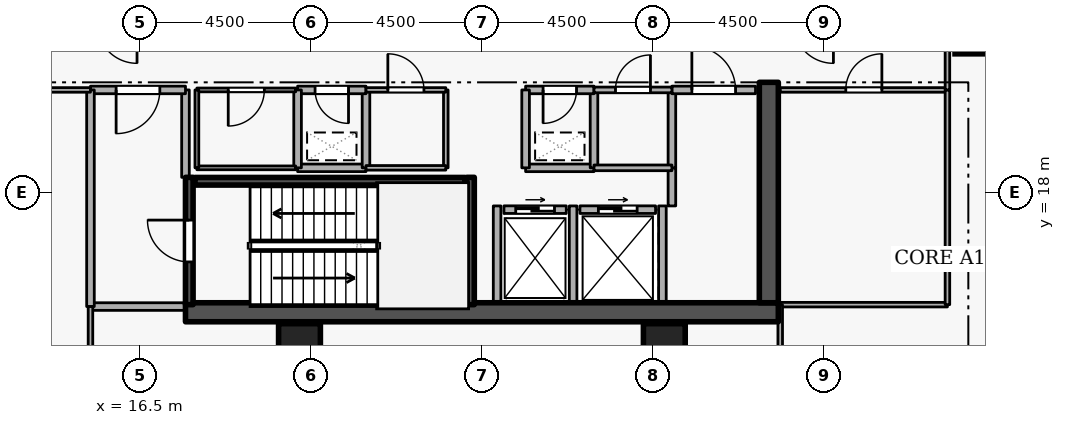
"""IFC4 building model, lengths in metres.
Left out: names, types, materials, properties, quantities, classifications, styles, units other than length and angle.
Written with IfcOpenShell. Run it as: python <this file> out.ifc"""

import sys

from ifc_helpers import new_model, si_unit, direction, frame, frame_2d, origin, origin_2d, place, context, subcontext, project, spatial, rectangle, extrude, element, fill, save


model = new_model("IFC4")
c1 = context("Model", 3, precision=1e-05, world=origin(), true_north=direction((0.0, 1.0)))
c2 = subcontext(c1, "Body", "Model", "MODEL_VIEW")
j1 = project(units=[si_unit("LENGTHUNIT", "METRE"), si_unit("PLANEANGLEUNIT", "RADIAN")], contexts=[c1])
p1 = place(None, origin())
s1 = spatial("IfcSite", under=j1, at=p1, CompositionType="ELEMENT")
p2 = place(p1, origin())
s2 = spatial("IfcBuilding", under=s1, at=p2, CompositionType="ELEMENT")
p3 = place(p2, frame((0.0, 0.0, 174.3)))
s3 = spatial("IfcBuildingStorey", under=s2, at=p3, CompositionType="ELEMENT", Elevation=174.3)
p4 = place(p3, frame((17.7, 14.85, 0.0), z_axis=(0.0, 0.0, 1.0), x_axis=(1.0, 0.0, 0.0)))
e1 = element("IfcWall", 1, at=p4, inside=s3, PredefinedType="SHEAR", context=c2, shape_type="SweptSolid", body=[
    extrude(rectangle(XDim=15.6, YDim=0.5, at=frame_2d((7.8, 0.0))), origin(), (0.0, 0.0, 1.0), 4.2),
])
p5 = place(p3, frame((33.05, 15.1, 0.0), z_axis=(0.0, 0.0, 1.0), x_axis=(0.0, 1.0, 0.0)))
e2 = element("IfcWall", 2, at=p5, inside=s3, PredefinedType="SHEAR", context=c2, shape_type="SweptSolid", body=[
    extrude(rectangle(XDim=5.8, YDim=0.5, at=frame_2d((2.9, 0.0))), origin(), (0.0, 0.0, 1.0), 4.2),
])
for number, where, z_axis, x_axis in (
    (3, (38.5, 22.2, 0.0), (0.0, 0.0, 1.0), (1.0, 0.0, 0.0)),
    (4, (20.7, 14.0, 0.0), (0.0, 0.0, 1.0), (1.0, 0.0, 0.0)),
    (5, (30.3, 14.0, 0.0), (0.0, 0.0, 1.0), (1.0, 0.0, 0.0)),
):
    element("IfcColumn", number, at=place(p3, frame(where, z_axis=z_axis, x_axis=x_axis)), inside=s3, PredefinedType="COLUMN", context=c2, shape_type="SweptSolid", body=[
        extrude(rectangle(XDim=1.1, YDim=1.1, at=origin_2d()), origin(), (0.0, 0.0, 1.0), 4.2),
    ])
p6 = place(p3, frame((26.08, 17.55, 0.0), z_axis=(0.0, 0.0, 1.0), x_axis=(1.0, 0.0, 0.0)))
e6 = element("IfcWall", 6, at=p6, inside=s3, PredefinedType="STANDARD", context=c2, shape_type="SweptSolid", body=[
    extrude(rectangle(XDim=1.64, YDim=0.2, at=frame_2d((0.82, 0.0))), origin(), (0.0, 0.0, 1.0), 3.94),
])
p7 = place(p6, frame((0.31, 0.0, 0.0)))
e7 = element("IfcOpeningElement", 7, at=p7, cuts=e6, PredefinedType="OPENING", context=c2, shape_type="SweptSolid", body=[
    extrude(rectangle(XDim=1.02, YDim=2.06, at=frame_2d((0.51, 1.03))), frame((0.0, 0.11, 0.0), z_axis=(0.0, -1.0, 0.0), x_axis=(1.0, 0.0, 0.0)), (0.0, 0.0, 1.0), 0.22),
])
p8 = place(p3, frame((28.08, 17.55, 0.0), z_axis=(0.0, 0.0, 1.0), x_axis=(1.0, 0.0, 0.0)))
e8 = element("IfcWall", 8, at=p8, inside=s3, PredefinedType="STANDARD", context=c2, shape_type="SweptSolid", body=[
    extrude(rectangle(XDim=1.99, YDim=0.2, at=frame_2d((0.995, 0.0))), origin(), (0.0, 0.0, 1.0), 3.94),
])
p9 = place(p8, frame((0.485, 0.0, 0.0)))
e9 = element("IfcOpeningElement", 9, at=p9, cuts=e8, PredefinedType="OPENING", context=c2, shape_type="SweptSolid", body=[
    extrude(rectangle(XDim=1.02, YDim=2.06, at=frame_2d((0.51, 1.03))), frame((0.0, 0.11, 0.0), z_axis=(0.0, -1.0, 0.0), x_axis=(1.0, 0.0, 0.0)), (0.0, 0.0, 1.0), 0.22),
])
for number, where, z_axis, x_axis in (
    (10, (27.9, 15.112, 0.0), (0.0, 0.0, 1.0), (0.0, 1.0, 0.0)),
    (11, (25.9, 15.112, 0.0), (0.0, 0.0, 1.0), (0.0, 1.0, 0.0)),
    (12, (30.25, 15.112, 0.0), (0.0, 0.0, 1.0), (0.0, 1.0, 0.0)),
):
    element("IfcWall", number, at=place(p3, frame(where, z_axis=z_axis, x_axis=x_axis)), inside=s3, PredefinedType="STANDARD", context=c2, shape_type="SweptSolid", body=[
        extrude(rectangle(XDim=2.536, YDim=0.2, at=frame_2d((1.268, 0.0))), origin(), (0.0, 0.0, 1.0), 3.94),
    ])
p10 = place(p3, frame((17.8, 15.05, 0.0), z_axis=(0.0, 0.0, 1.0), x_axis=(0.0, 1.0, 0.0)))
e13 = element("IfcWall", 13, at=p10, inside=s3, PredefinedType="SHEAR", context=c2, shape_type="SweptSolid", body=[
    extrude(rectangle(XDim=3.35, YDim=0.2, at=frame_2d((1.675, 0.0))), origin(), (0.0, 0.0, 1.0), 4.2),
])
p11 = place(p10, frame((1.125, 0.0, 0.0)))
e14 = element("IfcOpeningElement", 14, at=p11, cuts=e13, PredefinedType="OPENING", context=c2, shape_type="SweptSolid", body=[
    extrude(rectangle(XDim=1.1, YDim=2.1, at=frame_2d((0.55, 1.05))), frame((0.0, 0.11, 0.0), z_axis=(0.0, -1.0, 0.0), x_axis=(1.0, 0.0, 0.0)), (0.0, 0.0, 1.0), 0.22),
])
p12 = place(p3, frame((25.2, 18.4, 0.0), z_axis=(0.0, 0.0, 1.0), x_axis=(0.0, -1.0, 0.0)))
e15 = element("IfcWall", 15, at=p12, inside=s3, PredefinedType="SHEAR", context=c2, shape_type="SweptSolid", body=[
    extrude(rectangle(XDim=3.35, YDim=0.2, at=frame_2d((1.675, 0.0))), origin(), (0.0, 0.0, 1.0), 4.2),
])
p13 = place(p3, frame((25.05, 18.297, 0.0), z_axis=(0.0, 0.0, 1.0), x_axis=(-1.0, 0.0, 0.0)))
e16 = element("IfcWall", 16, at=p13, inside=s3, PredefinedType="SHEAR", context=c2, shape_type="SweptSolid", body=[
    extrude(rectangle(XDim=7.1, YDim=0.2, at=frame_2d((3.55, 0.0))), origin(), (0.0, 0.0, 1.0), 4.2),
])
p14 = place(p3, frame((15.2, 15.0, 0.0), z_axis=(0.0, 0.0, 1.0), x_axis=(1.0, 0.0, 0.0)))
e17 = element("IfcWall", 17, at=p14, inside=s3, PredefinedType="STANDARD", context=c2, shape_type="SweptSolid", body=[
    extrude(rectangle(XDim=2.5, YDim=0.2, at=frame_2d((1.25, 0.0))), origin(), (0.0, 0.0, 1.0), 3.94),
])
p15 = place(p3, frame((17.7, 18.4, 0.0), z_axis=(0.0, 0.0, 1.0), x_axis=(0.0, 1.0, 0.0)))
e18 = element("IfcWall", 18, at=p15, inside=s3, PredefinedType="STANDARD", context=c2, shape_type="SweptSolid", body=[
    extrude(rectangle(XDim=2.3, YDim=0.2, at=frame_2d((1.15, 0.0))), origin(), (0.0, 0.0, 1.0), 3.145),
])
p16 = place(p3, frame((17.7, 20.7, 0.0), z_axis=(0.0, 0.0, 1.0), x_axis=(-1.0, 0.0, 0.0)))
e19 = element("IfcWall", 19, at=p16, inside=s3, PredefinedType="STANDARD", context=c2, shape_type="SweptSolid", body=[
    extrude(rectangle(XDim=2.5, YDim=0.2, at=frame_2d((1.25, 0.0))), origin(), (0.0, 0.0, 1.0), 3.94),
])
p17 = place(p16, frame((0.675, 0.0, 0.0)))
e20 = element("IfcOpeningElement", 20, at=p17, cuts=e19, PredefinedType="OPENING", context=c2, shape_type="SweptSolid", body=[
    extrude(rectangle(XDim=1.15, YDim=2.1, at=frame_2d((0.575, 1.05))), frame((0.0, 0.11, 0.0), z_axis=(0.0, -1.0, 0.0), x_axis=(1.0, 0.0, 0.0)), (0.0, 0.0, 1.0), 0.22),
])
p18 = place(p3, frame((15.2, 20.7, 0.0), z_axis=(0.0, 0.0, 1.0), x_axis=(0.0, -1.0, 0.0)))
e21 = element("IfcWall", 21, at=p18, inside=s3, PredefinedType="STANDARD", context=c2, shape_type="SweptSolid", body=[
    extrude(rectangle(XDim=5.7, YDim=0.2, at=frame_2d((2.85, 0.0))), origin(), (0.0, 0.0, 1.0), 3.94),
])
p19 = place(p3, frame((26.65, 18.65, 0.0), z_axis=(0.0, 0.0, 1.0), x_axis=(1.0, 0.0, 0.0)))
e22 = element("IfcWall", 22, at=p19, inside=s3, PredefinedType="STANDARD", context=c2, shape_type="SweptSolid", body=[
    extrude(rectangle(XDim=1.8, YDim=0.2, at=frame_2d((0.9, 0.0))), origin(), (0.0, 0.0, 1.0), 3.94),
])
p20 = place(p3, frame((28.45, 18.65, 0.0), z_axis=(0.0, 0.0, 1.0), x_axis=(0.0, 1.0, 0.0)))
e23 = element("IfcWall", 23, at=p20, inside=s3, PredefinedType="STANDARD", context=c2, shape_type="SweptSolid", body=[
    extrude(rectangle(XDim=2.05, YDim=0.2, at=frame_2d((1.025, 0.0))), origin(), (0.0, 0.0, 1.0), 3.94),
])
p21 = place(p3, frame((28.45, 20.7, 0.0), z_axis=(0.0, 0.0, 1.0), x_axis=(-1.0, 0.0, 0.0)))
e24 = element("IfcWall", 24, at=p21, inside=s3, PredefinedType="STANDARD", context=c2, shape_type="SweptSolid", body=[
    extrude(rectangle(XDim=1.8, YDim=0.2, at=frame_2d((0.9, 0.0))), origin(), (0.0, 0.0, 1.0), 3.94),
])
p22 = place(p21, frame((0.46, 0.0, 0.0)))
e25 = element("IfcOpeningElement", 25, at=p22, cuts=e24, PredefinedType="OPENING", context=c2, shape_type="SweptSolid", body=[
    extrude(rectangle(XDim=0.88, YDim=2.04, at=frame_2d((0.44, 1.02))), frame((0.0, 0.11, 0.0), z_axis=(0.0, -1.0, 0.0), x_axis=(1.0, 0.0, 0.0)), (0.0, 0.0, 1.0), 0.22),
])
p23 = place(p3, frame((26.65, 20.7, 0.0), z_axis=(0.0, 0.0, 1.0), x_axis=(0.0, -1.0, 0.0)))
e26 = element("IfcWall", 26, at=p23, inside=s3, PredefinedType="STANDARD", context=c2, shape_type="SweptSolid", body=[
    extrude(rectangle(XDim=2.05, YDim=0.2, at=frame_2d((1.025, 0.0))), origin(), (0.0, 0.0, 1.0), 3.94),
])
p24 = place(p3, frame((20.65, 18.65, 0.0), z_axis=(0.0, 0.0, 1.0), x_axis=(1.0, 0.0, 0.0)))
e27 = element("IfcWall", 27, at=p24, inside=s3, PredefinedType="STANDARD", context=c2, shape_type="SweptSolid", body=[
    extrude(rectangle(XDim=1.8, YDim=0.2, at=frame_2d((0.9, 0.0))), origin(), (0.0, 0.0, 1.0), 3.94),
])
p25 = place(p3, frame((22.45, 18.65, 0.0), z_axis=(0.0, 0.0, 1.0), x_axis=(0.0, 1.0, 0.0)))
e28 = element("IfcWall", 28, at=p25, inside=s3, PredefinedType="STANDARD", context=c2, shape_type="SweptSolid", body=[
    extrude(rectangle(XDim=2.05, YDim=0.2, at=frame_2d((1.025, 0.0))), origin(), (0.0, 0.0, 1.0), 3.94),
])
p26 = place(p3, frame((22.45, 20.7, 0.0), z_axis=(0.0, 0.0, 1.0), x_axis=(-1.0, 0.0, 0.0)))
e29 = element("IfcWall", 29, at=p26, inside=s3, PredefinedType="STANDARD", context=c2, shape_type="SweptSolid", body=[
    extrude(rectangle(XDim=1.8, YDim=0.2, at=frame_2d((0.9, 0.0))), origin(), (0.0, 0.0, 1.0), 3.94),
])
p27 = place(p26, frame((0.46, 0.0, 0.0)))
e30 = element("IfcOpeningElement", 30, at=p27, cuts=e29, PredefinedType="OPENING", context=c2, shape_type="SweptSolid", body=[
    extrude(rectangle(XDim=0.88, YDim=2.04, at=frame_2d((0.44, 1.02))), frame((0.0, 0.11, 0.0), z_axis=(0.0, -1.0, 0.0), x_axis=(1.0, 0.0, 0.0)), (0.0, 0.0, 1.0), 0.22),
])
p28 = place(p3, frame((20.65, 20.7, 0.0), z_axis=(0.0, 0.0, 1.0), x_axis=(0.0, -1.0, 0.0)))
e31 = element("IfcWall", 31, at=p28, inside=s3, PredefinedType="STANDARD", context=c2, shape_type="SweptSolid", body=[
    extrude(rectangle(XDim=2.05, YDim=0.2, at=frame_2d((1.025, 0.0))), origin(), (0.0, 0.0, 1.0), 3.94),
])
p29 = place(p3, frame((30.5, 17.648, 0.0), z_axis=(0.0, 0.0, 1.0), x_axis=(0.0, 1.0, 0.0)))
e32 = element("IfcWall", 32, at=p29, inside=s3, PredefinedType="STANDARD", context=c2, shape_type="SweptSolid", body=[
    extrude(rectangle(XDim=1.002, YDim=0.2, at=frame_2d((0.501, 0.0))), origin(), (0.0, 0.0, 1.0), 3.94),
])
p30 = place(p3, frame((30.5, 18.65, 0.0), z_axis=(0.0, 0.0, 1.0), x_axis=(0.0, 1.0, 0.0)))
e33 = element("IfcWall", 33, at=p30, inside=s3, PredefinedType="STANDARD", context=c2, shape_type="SweptSolid", body=[
    extrude(rectangle(XDim=2.05, YDim=0.2, at=frame_2d((1.025, 0.0))), origin(), (0.0, 0.0, 1.0), 3.94),
])
p31 = place(p3, frame((30.5, 20.7, 0.0), z_axis=(0.0, 0.0, 1.0), x_axis=(1.0, 0.0, 0.0)))
e34 = element("IfcWall", 34, at=p31, inside=s3, PredefinedType="STANDARD", context=c2, shape_type="SweptSolid", body=[
    extrude(rectangle(XDim=2.2, YDim=0.2, at=frame_2d((1.1, 0.0))), origin(), (0.0, 0.0, 1.0), 3.94),
])
p32 = place(p31, frame((0.525, 0.0, 0.0)))
e35 = element("IfcOpeningElement", 35, at=p32, cuts=e34, PredefinedType="OPENING", context=c2, shape_type="SweptSolid", body=[
    extrude(rectangle(XDim=1.15, YDim=2.1, at=frame_2d((0.575, 1.05))), frame((0.0, 0.11, 0.0), z_axis=(0.0, -1.0, 0.0), x_axis=(1.0, 0.0, 0.0)), (0.0, 0.0, 1.0), 0.22),
])
p33 = place(p3, frame((18.0, 18.65, 0.0), z_axis=(0.0, 0.0, 1.0), x_axis=(1.0, 0.0, 0.0)))
e36 = element("IfcWall", 36, at=p33, inside=s3, PredefinedType="PARTITIONING", context=c2, shape_type="SweptSolid", body=[
    extrude(rectangle(XDim=2.6, YDim=0.1, at=frame_2d((1.3, 0.0))), origin(), (0.0, 0.0, 1.0), 3.94),
])
p34 = place(p3, frame((20.6, 20.7, 0.0), z_axis=(0.0, 0.0, 1.0), x_axis=(-1.0, 0.0, 0.0)))
e37 = element("IfcWall", 37, at=p34, inside=s3, PredefinedType="PARTITIONING", context=c2, shape_type="SweptSolid", body=[
    extrude(rectangle(XDim=2.6, YDim=0.1, at=frame_2d((1.3, 0.0))), origin(), (0.0, 0.0, 1.0), 3.94),
])
p35 = place(p34, frame((0.825, 0.0, 0.0)))
e38 = element("IfcOpeningElement", 38, at=p35, cuts=e37, PredefinedType="OPENING", context=c2, shape_type="SweptSolid", body=[
    extrude(rectangle(XDim=0.95, YDim=2.1, at=frame_2d((0.475, 1.05))), frame((0.0, 0.06, 0.0), z_axis=(0.0, -1.0, 0.0), x_axis=(1.0, 0.0, 0.0)), (0.0, 0.0, 1.0), 0.12),
])
p36 = place(p3, frame((18.0, 20.7, 0.0), z_axis=(0.0, 0.0, 1.0), x_axis=(0.0, -1.0, 0.0)))
e39 = element("IfcWall", 39, at=p36, inside=s3, PredefinedType="PARTITIONING", context=c2, shape_type="SweptSolid", body=[
    extrude(rectangle(XDim=2.05, YDim=0.1, at=frame_2d((1.025, 0.0))), origin(), (0.0, 0.0, 1.0), 3.145),
])
p37 = place(p3, frame((24.55, 20.7, 0.0), z_axis=(0.0, 0.0, 1.0), x_axis=(0.0, -1.0, 0.0)))
e40 = element("IfcWall", 40, at=p37, inside=s3, PredefinedType="PARTITIONING", context=c2, shape_type="SweptSolid", body=[
    extrude(rectangle(XDim=2.05, YDim=0.12, at=frame_2d((1.025, 0.0))), origin(), (0.0, 0.0, 1.0), 3.94),
])
p38 = place(p3, frame((24.55, 18.65, 0.0), z_axis=(0.0, 0.0, 1.0), x_axis=(-1.0, 0.0, 0.0)))
e41 = element("IfcWall", 41, at=p38, inside=s3, PredefinedType="PARTITIONING", context=c2, shape_type="SweptSolid", body=[
    extrude(rectangle(XDim=2.1, YDim=0.12, at=frame_2d((1.05, 0.0))), origin(), (0.0, 0.0, 1.0), 3.94),
])
p39 = place(p3, frame((22.45, 20.7, 0.0), z_axis=(0.0, 0.0, 1.0), x_axis=(1.0, 0.0, 0.0)))
e42 = element("IfcWall", 42, at=p39, inside=s3, PredefinedType="PARTITIONING", context=c2, shape_type="SweptSolid", body=[
    extrude(rectangle(XDim=2.1, YDim=0.12, at=frame_2d((1.05, 0.0))), origin(), (0.0, 0.0, 1.0), 3.94),
])
p40 = place(p39, frame((0.575, 0.0, 0.0)))
e43 = element("IfcOpeningElement", 43, at=p40, cuts=e42, PredefinedType="OPENING", context=c2, shape_type="SweptSolid", body=[
    extrude(rectangle(XDim=0.95, YDim=2.1, at=frame_2d((0.475, 1.05))), frame((0.0, 0.07, 0.0), z_axis=(0.0, -1.0, 0.0), x_axis=(1.0, 0.0, 0.0)), (0.0, 0.0, 1.0), 0.14),
])
p41 = place(p3, frame((30.5, 18.65, 0.0), z_axis=(0.0, 0.0, 1.0), x_axis=(-1.0, 0.0, 0.0)))
e44 = element("IfcWall", 44, at=p41, inside=s3, PredefinedType="PARTITIONING", context=c2, shape_type="SweptSolid", body=[
    extrude(rectangle(XDim=2.05, YDim=0.15, at=frame_2d((1.025, 0.0))), origin(), (0.0, 0.0, 1.0), 3.94),
])
p42 = place(p3, frame((28.45, 20.7, 0.0), z_axis=(0.0, 0.0, 1.0), x_axis=(1.0, 0.0, 0.0)))
e45 = element("IfcWall", 45, at=p42, inside=s3, PredefinedType="PARTITIONING", context=c2, shape_type="SweptSolid", body=[
    extrude(rectangle(XDim=2.05, YDim=0.15, at=frame_2d((1.025, 0.0))), origin(), (0.0, 0.0, 1.0), 3.94),
])
p43 = place(p42, frame((0.565, 0.0, 0.0)))
e46 = element("IfcOpeningElement", 46, at=p43, cuts=e45, PredefinedType="OPENING", context=c2, shape_type="SweptSolid", body=[
    extrude(rectangle(XDim=0.92, YDim=2.08, at=frame_2d((0.46, 1.04))), frame((0.0, 0.085, 0.0), z_axis=(0.0, -1.0, 0.0), x_axis=(1.0, 0.0, 0.0)), (0.0, 0.0, 1.0), 0.17),
])
p44 = place(p3, frame((37.75, 15.05, 0.0), z_axis=(0.0, 0.0, 1.0), x_axis=(-1.0, 0.0, 0.0)))
e47 = element("IfcWall", 47, at=p44, inside=s3, PredefinedType="PARTITIONING", context=c2, shape_type="SweptSolid", body=[
    extrude(rectangle(XDim=4.4, YDim=0.12, at=frame_2d((2.2, 0.0))), origin(), (0.0, 0.0, 1.0), 3.94),
])
p45 = place(p3, frame((33.35, 20.7, 0.0), z_axis=(0.0, 0.0, 1.0), x_axis=(1.0, 0.0, 0.0)))
e48 = element("IfcWall", 48, at=p45, inside=s3, PredefinedType="PARTITIONING", context=c2, shape_type="SweptSolid", body=[
    extrude(rectangle(XDim=4.4, YDim=0.12, at=frame_2d((2.2, 0.0))), origin(), (0.0, 0.0, 1.0), 3.94),
])
p46 = place(p45, frame((1.725, 0.0, 0.0)))
e49 = element("IfcOpeningElement", 49, at=p46, cuts=e48, PredefinedType="OPENING", context=c2, shape_type="SweptSolid", body=[
    extrude(rectangle(XDim=0.95, YDim=2.1, at=frame_2d((0.475, 1.05))), frame((0.0, 0.07, 0.0), z_axis=(0.0, -1.0, 0.0), x_axis=(1.0, 0.0, 0.0)), (0.0, 0.0, 1.0), 0.14),
])
p47 = place(p3, frame((37.75, 20.7, 0.0), z_axis=(0.0, 0.0, 1.0), x_axis=(0.0, -1.0, 0.0)))
e50 = element("IfcWall", 50, at=p47, inside=s3, PredefinedType="PARTITIONING", context=c2, shape_type="SweptSolid", body=[
    extrude(rectangle(XDim=5.65, YDim=0.12, at=frame_2d((2.825, 0.0))), origin(), (0.0, 0.0, 1.0), 3.94),
])
p48 = place(p3, frame((13.25, 20.7, 0.0), z_axis=(0.0, 0.0, 1.0), x_axis=(1.0, 0.0, 0.0)))
e51 = element("IfcWall", 51, at=p48, inside=s3, PredefinedType="PARTITIONING", context=c2, shape_type="SweptSolid", body=[
    extrude(rectangle(XDim=1.95, YDim=0.12, at=frame_2d((0.975, 0.0))), origin(), (0.0, 0.0, 1.0), 3.94),
])
p49 = place(p3, frame((15.2, 15.0, 0.0), z_axis=(0.0, 0.0, 1.0), x_axis=(0.0, -1.0, 0.0)))
e52 = element("IfcWall", 52, at=p49, inside=s3, PredefinedType="PARTITIONING", context=c2, shape_type="SweptSolid", body=[
    extrude(rectangle(XDim=5.72, YDim=0.12, at=frame_2d((2.86, 0.0))), origin(), (0.0, 0.0, 1.0), 3.94),
])
p50 = place(p3, frame((37.75, 20.7, 0.0), z_axis=(0.0, 0.0, 1.0), x_axis=(0.0, 1.0, 0.0)))
e53 = element("IfcWall", 53, at=p50, inside=s3, PredefinedType="PARTITIONING", context=c2, shape_type="SweptSolid", body=[
    extrude(rectangle(XDim=1.75, YDim=0.12, at=frame_2d((0.875, 0.0))), origin(), (0.0, 0.0, 1.0), 3.94),
])
p51 = place(p3, frame((33.35, 9.28, 0.0), z_axis=(0.0, 0.0, 1.0), x_axis=(0.0, 1.0, 0.0)))
e54 = element("IfcWall", 54, at=p51, inside=s3, PredefinedType="PARTITIONING", context=c2, shape_type="SweptSolid", body=[
    extrude(rectangle(XDim=5.77, YDim=0.12, at=frame_2d((2.885, 0.0))), origin(), (0.0, 0.0, 1.0), 3.145),
])
p52 = place(p7, origin())
e55 = element("IfcDoor", 55, at=p52, inside=s3, OperationType="SLIDING_TO_LEFT", PredefinedType="DOOR", context=c2, shape_type="SweptSolid", body=[
    extrude(rectangle(XDim=1.02, YDim=2.06, at=frame_2d((0.51, 1.03))), frame((0.0, 0.025, 0.0), z_axis=(0.0, -1.0, 0.0), x_axis=(1.0, 0.0, 0.0)), (0.0, 0.0, 1.0), 0.05),
])
fill(e7, e55)
p53 = place(p9, origin())
e56 = element("IfcDoor", 56, at=p53, inside=s3, OperationType="SLIDING_TO_LEFT", PredefinedType="DOOR", context=c2, shape_type="SweptSolid", body=[
    extrude(rectangle(XDim=1.02, YDim=2.06, at=frame_2d((0.51, 1.03))), frame((0.0, 0.025, 0.0), z_axis=(0.0, -1.0, 0.0), x_axis=(1.0, 0.0, 0.0)), (0.0, 0.0, 1.0), 0.05),
])
fill(e9, e56)
p54 = place(p11, origin())
e57 = element("IfcDoor", 57, at=p54, inside=s3, OperationType="SINGLE_SWING_RIGHT", PredefinedType="DOOR", context=c2, shape_type="SweptSolid", body=[
    extrude(rectangle(XDim=1.1, YDim=2.1, at=frame_2d((0.55, 1.05))), frame((0.0, 0.025, 0.0), z_axis=(0.0, -1.0, 0.0), x_axis=(1.0, 0.0, 0.0)), (0.0, 0.0, 1.0), 0.05),
])
fill(e14, e57)
p55 = place(p17, origin())
e58 = element("IfcDoor", 58, at=p55, inside=s3, OperationType="SINGLE_SWING_RIGHT", PredefinedType="DOOR", context=c2, shape_type="SweptSolid", body=[
    extrude(rectangle(XDim=1.15, YDim=2.1, at=frame_2d((0.575, 1.05))), frame((0.0, 0.025, 0.0), z_axis=(0.0, -1.0, 0.0), x_axis=(1.0, 0.0, 0.0)), (0.0, 0.0, 1.0), 0.05),
])
fill(e20, e58)
p56 = place(p22, origin())
e59 = element("IfcDoor", 59, at=p56, inside=s3, OperationType="SINGLE_SWING_RIGHT", PredefinedType="DOOR", context=c2, shape_type="SweptSolid", body=[
    extrude(rectangle(XDim=0.88, YDim=2.04, at=frame_2d((0.44, 1.02))), frame((0.0, 0.025, 0.0), z_axis=(0.0, -1.0, 0.0), x_axis=(1.0, 0.0, 0.0)), (0.0, 0.0, 1.0), 0.05),
])
fill(e25, e59)
p57 = place(p27, origin())
e60 = element("IfcDoor", 60, at=p57, inside=s3, OperationType="SINGLE_SWING_LEFT", PredefinedType="DOOR", context=c2, shape_type="SweptSolid", body=[
    extrude(rectangle(XDim=0.88, YDim=2.04, at=frame_2d((0.44, 1.02))), frame((0.0, 0.025, 0.0), z_axis=(0.0, -1.0, 0.0), x_axis=(1.0, 0.0, 0.0)), (0.0, 0.0, 1.0), 0.05),
])
fill(e30, e60)
p58 = place(p35, origin())
e61 = element("IfcDoor", 61, at=p58, inside=s3, OperationType="SINGLE_SWING_RIGHT", PredefinedType="DOOR", context=c2, shape_type="SweptSolid", body=[
    extrude(rectangle(XDim=0.95, YDim=2.1, at=frame_2d((0.475, 1.05))), frame((0.0, 0.025, 0.0), z_axis=(0.0, -1.0, 0.0), x_axis=(1.0, 0.0, 0.0)), (0.0, 0.0, 1.0), 0.05),
])
fill(e38, e61)
p59 = place(p40, origin())
e62 = element("IfcDoor", 62, at=p59, inside=s3, OperationType="SINGLE_SWING_LEFT", PredefinedType="DOOR", context=c2, shape_type="SweptSolid", body=[
    extrude(rectangle(XDim=0.95, YDim=2.1, at=frame_2d((0.475, 1.05))), frame((0.0, 0.025, 0.0), z_axis=(0.0, -1.0, 0.0), x_axis=(1.0, 0.0, 0.0)), (0.0, 0.0, 1.0), 0.05),
])
fill(e43, e62)
p60 = place(p43, origin())
e63 = element("IfcDoor", 63, at=p60, inside=s3, OperationType="SINGLE_SWING_RIGHT", PredefinedType="DOOR", context=c2, shape_type="SweptSolid", body=[
    extrude(rectangle(XDim=0.92, YDim=2.08, at=frame_2d((0.46, 1.04))), frame((0.0, 0.025, 0.0), z_axis=(0.0, -1.0, 0.0), x_axis=(1.0, 0.0, 0.0)), (0.0, 0.0, 1.0), 0.05),
])
fill(e46, e63)
p61 = place(p32, origin())
e64 = element("IfcDoor", 64, at=p61, inside=s3, OperationType="SINGLE_SWING_LEFT", PredefinedType="DOOR", context=c2, shape_type="SweptSolid", body=[
    extrude(rectangle(XDim=1.15, YDim=2.1, at=frame_2d((0.575, 1.05))), frame((0.0, 0.025, 0.0), z_axis=(0.0, -1.0, 0.0), x_axis=(1.0, 0.0, 0.0)), (0.0, 0.0, 1.0), 0.05),
])
fill(e35, e64)
p62 = place(p46, origin())
e65 = element("IfcDoor", 65, at=p62, inside=s3, OperationType="SINGLE_SWING_RIGHT", PredefinedType="DOOR", context=c2, shape_type="SweptSolid", body=[
    extrude(rectangle(XDim=0.95, YDim=2.1, at=frame_2d((0.475, 1.05))), frame((0.0, 0.025, 0.0), z_axis=(0.0, -1.0, 0.0), x_axis=(1.0, 0.0, 0.0)), (0.0, 0.0, 1.0), 0.05),
])
fill(e49, e65)
save(model, sys.argv[1])
